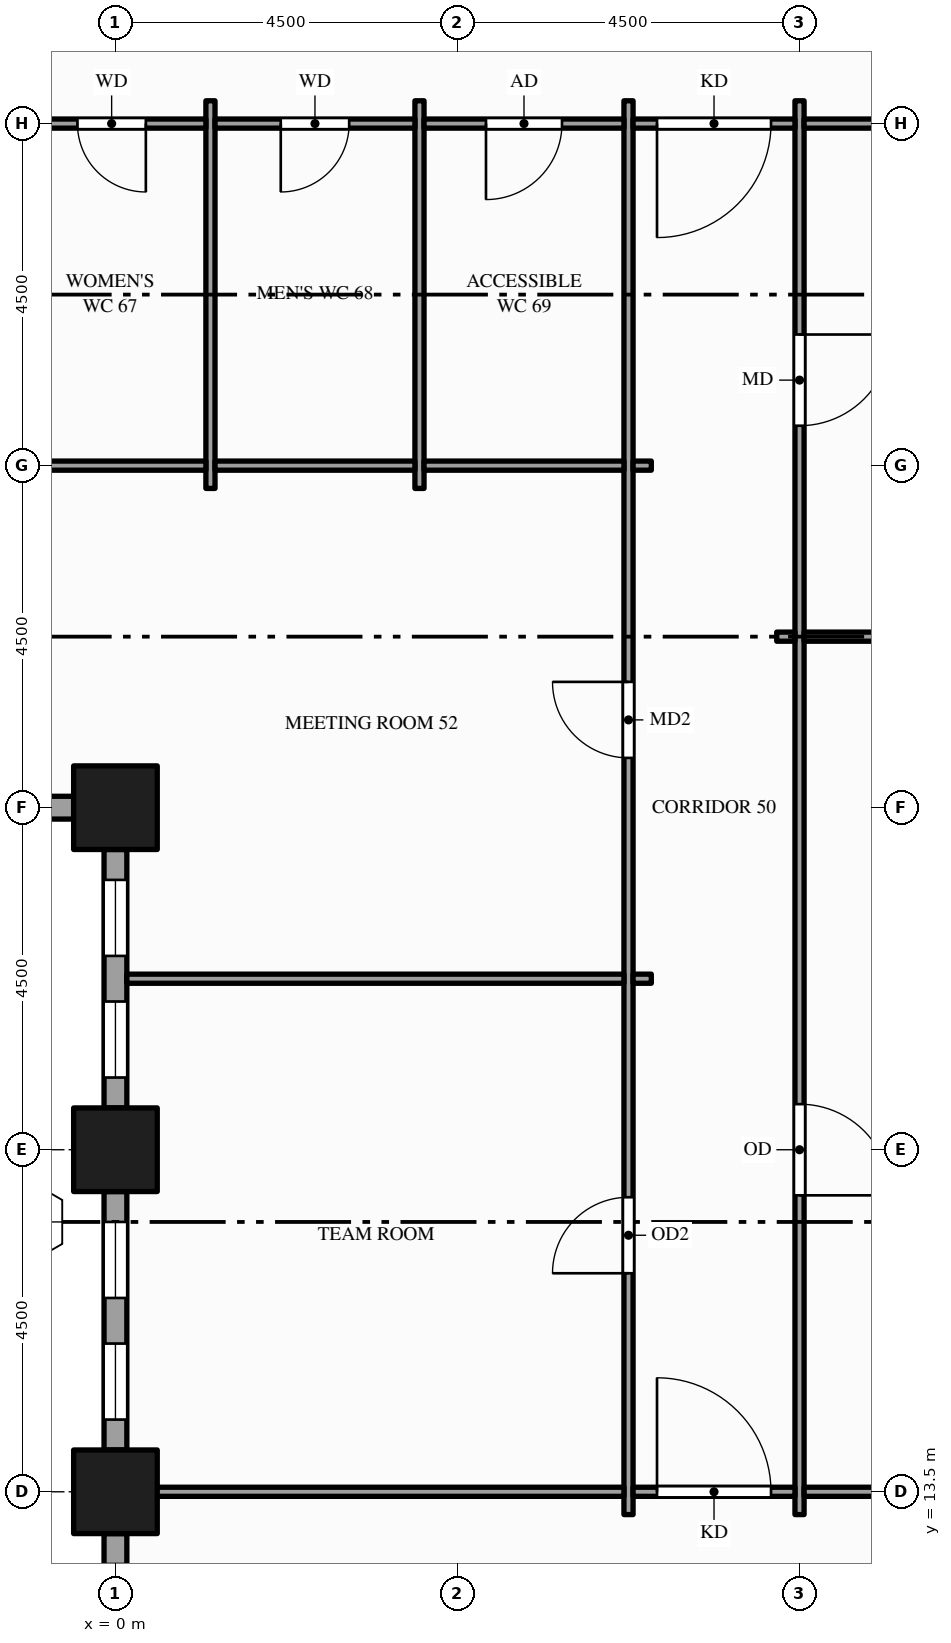
"""IFC4 building model, lengths in metres.
Left out: names, types, materials, properties, quantities, classifications, styles, units other than length and angle.
Written with IfcOpenShell. Run it as: python <this file> out.ifc"""

import sys

from ifc_helpers import new_model, si_unit, direction, frame, frame_2d, origin, origin_2d, place, context, subcontext, project, spatial, rectangle, hollow_rectangle, extrude, element, fill, save


model = new_model("IFC4")
c1 = context("Model", 3, precision=1e-05, world=origin(), true_north=direction((0.0, 1.0)))
c2 = subcontext(c1, "Body", "Model", "MODEL_VIEW")
j1 = project(units=[si_unit("LENGTHUNIT", "METRE"), si_unit("PLANEANGLEUNIT", "RADIAN")], contexts=[c1])
p1 = place(None, origin())
s1 = spatial("IfcSite", under=j1, at=p1, CompositionType="ELEMENT")
p2 = place(p1, origin())
s2 = spatial("IfcBuilding", under=s1, at=p2, CompositionType="ELEMENT")
p3 = place(p2, frame((0.0, 0.0, 45.0)))
s3 = spatial("IfcBuildingStorey", under=s2, at=p3, CompositionType="ELEMENT", Elevation=45.0)
for number, where, z_axis, x_axis in (
    (1, (0.0, 13.5, -0.15), (0.0, 0.0, 1.0), (1.0, 0.0, 0.0)),
    (2, (0.0, 18.0, -0.15), (0.0, 0.0, 1.0), (1.0, 0.0, 0.0)),
    (3, (0.0, 22.5, -0.15), (0.0, 0.0, 1.0), (1.0, 0.0, 0.0)),
):
    element("IfcColumn", number, at=place(p3, frame(where, z_axis=z_axis, x_axis=x_axis)), inside=s3, PredefinedType="COLUMN", context=c2, shape_type="SweptSolid", body=[
        extrude(hollow_rectangle(XDim=1.1, YDim=1.1, WallThickness=0.06, at=origin_2d()), origin(), (0.0, 0.0, 1.0), 4.0),
    ])
p4 = place(p3, frame((-0.95, 22.5, 0.0), z_axis=(0.0, 0.0, 1.0), x_axis=(1.0, 0.0, 0.0)))
e4 = element("IfcWall", 4, at=p4, inside=s3, PredefinedType="STANDARD", context=c2, shape_type="SweptSolid", body=[
    extrude(rectangle(XDim=0.4, YDim=0.3, at=frame_2d((0.2, 0.0))), origin(), (0.0, 0.0, 1.0), 3.144),
])
p5 = place(p3, frame((0.0, 21.95, 0.0), z_axis=(0.0, 0.0, 1.0), x_axis=(0.0, -1.0, 0.0)))
e5 = element("IfcWall", 5, at=p5, inside=s3, PredefinedType="STANDARD", context=c2, shape_type="SweptSolid", body=[
    extrude(rectangle(XDim=3.4, YDim=0.3, at=frame_2d((1.7, 0.0))), origin(), (0.0, 0.0, 1.0), 3.144),
])
p6 = place(p5, frame((0.4, 0.0, 0.9)))
e6 = element("IfcOpeningElement", 6, at=p6, cuts=e5, PredefinedType="OPENING", context=c2, shape_type="SweptSolid", body=[
    extrude(rectangle(XDim=1.0, YDim=2.0, at=frame_2d((0.5, 1.0))), frame((0.0, 0.16, 0.0), z_axis=(0.0, -1.0, 0.0), x_axis=(1.0, 0.0, 0.0)), (0.0, 0.0, 1.0), 0.32),
])
p7 = place(p5, frame((2.0, 0.0, 0.9)))
e7 = element("IfcOpeningElement", 7, at=p7, cuts=e5, PredefinedType="OPENING", context=c2, shape_type="SweptSolid", body=[
    extrude(rectangle(XDim=1.0, YDim=2.0, at=frame_2d((0.5, 1.0))), frame((0.0, 0.16, 0.0), z_axis=(0.0, -1.0, 0.0), x_axis=(1.0, 0.0, 0.0)), (0.0, 0.0, 1.0), 0.32),
])
p8 = place(p3, frame((0.0, 17.45, 0.0), z_axis=(0.0, 0.0, 1.0), x_axis=(0.0, -1.0, 0.0)))
e8 = element("IfcWall", 8, at=p8, inside=s3, PredefinedType="STANDARD", context=c2, shape_type="SweptSolid", body=[
    extrude(rectangle(XDim=3.4, YDim=0.3, at=frame_2d((1.7, 0.0))), origin(), (0.0, 0.0, 1.0), 3.144),
])
p9 = place(p8, frame((0.4, 0.0, 0.9)))
e9 = element("IfcOpeningElement", 9, at=p9, cuts=e8, PredefinedType="OPENING", context=c2, shape_type="SweptSolid", body=[
    extrude(rectangle(XDim=1.0, YDim=2.0, at=frame_2d((0.5, 1.0))), frame((0.0, 0.16, 0.0), z_axis=(0.0, -1.0, 0.0), x_axis=(1.0, 0.0, 0.0)), (0.0, 0.0, 1.0), 0.32),
])
p10 = place(p8, frame((2.0, 0.0, 0.9)))
e10 = element("IfcOpeningElement", 10, at=p10, cuts=e8, PredefinedType="OPENING", context=c2, shape_type="SweptSolid", body=[
    extrude(rectangle(XDim=1.0, YDim=2.0, at=frame_2d((0.5, 1.0))), frame((0.0, 0.16, 0.0), z_axis=(0.0, -1.0, 0.0), x_axis=(1.0, 0.0, 0.0)), (0.0, 0.0, 1.0), 0.32),
])
p11 = place(p3, frame((0.0, 12.95, 0.0), z_axis=(0.0, 0.0, 1.0), x_axis=(0.0, -1.0, 0.0)))
e11 = element("IfcWall", 11, at=p11, inside=s3, PredefinedType="STANDARD", context=c2, shape_type="SweptSolid", body=[
    extrude(rectangle(XDim=3.4, YDim=0.3, at=frame_2d((1.7, 0.0))), origin(), (0.0, 0.0, 1.0), 3.144),
])
p12 = place(p11, frame((0.4, 0.0, 0.9)))
e12 = element("IfcOpeningElement", 12, at=p12, cuts=e11, PredefinedType="OPENING", context=c2, shape_type="SweptSolid", body=[
    extrude(rectangle(XDim=1.0, YDim=2.0, at=frame_2d((0.5, 1.0))), frame((0.0, 0.16, 0.0), z_axis=(0.0, -1.0, 0.0), x_axis=(1.0, 0.0, 0.0)), (0.0, 0.0, 1.0), 0.32),
])
p13 = place(p11, frame((2.0, 0.0, 0.9)))
e13 = element("IfcOpeningElement", 13, at=p13, cuts=e11, PredefinedType="OPENING", context=c2, shape_type="SweptSolid", body=[
    extrude(rectangle(XDim=1.0, YDim=2.0, at=frame_2d((0.5, 1.0))), frame((0.0, 0.16, 0.0), z_axis=(0.0, -1.0, 0.0), x_axis=(1.0, 0.0, 0.0)), (0.0, 0.0, 1.0), 0.32),
])
for number, where, z_axis, x_axis in (
    (14, (1.25, 26.7, 0.0), (0.0, 0.0, 1.0), (0.0, 1.0, 0.0)),
    (15, (4.0, 26.7, 0.0), (0.0, 0.0, 1.0), (0.0, 1.0, 0.0)),
):
    element("IfcWall", number, at=place(p3, frame(where, z_axis=z_axis, x_axis=x_axis)), inside=s3, PredefinedType="PARTITIONING", context=c2, shape_type="SweptSolid", body=[
        extrude(rectangle(XDim=5.1, YDim=0.12, at=frame_2d((2.55, 0.0))), origin(), (0.0, 0.0, 1.0), 3.85),
    ])
p14 = place(p3, frame((6.75, 13.2, 0.0), z_axis=(0.0, 0.0, 1.0), x_axis=(0.0, 1.0, 0.0)))
e16 = element("IfcWall", 16, at=p14, inside=s3, PredefinedType="PARTITIONING", context=c2, shape_type="SweptSolid", body=[
    extrude(rectangle(XDim=18.6, YDim=0.12, at=frame_2d((9.3, 0.0))), origin(), (0.0, 0.0, 1.0), 2.6),
])
p15 = place(p14, frame((3.175, 0.0, 0.0)))
e17 = element("IfcOpeningElement", 17, at=p15, cuts=e16, PredefinedType="OPENING", context=c2, shape_type="SweptSolid", body=[
    extrude(rectangle(XDim=1.0, YDim=2.1, at=frame_2d((0.5, 1.05))), frame((0.0, 0.07, 0.0), z_axis=(0.0, -1.0, 0.0), x_axis=(1.0, 0.0, 0.0)), (0.0, 0.0, 1.0), 0.14),
])
p16 = place(p14, frame((9.955, 0.0, 0.0)))
e18 = element("IfcOpeningElement", 18, at=p16, cuts=e16, PredefinedType="OPENING", context=c2, shape_type="SweptSolid", body=[
    extrude(rectangle(XDim=1.0, YDim=2.1, at=frame_2d((0.5, 1.05))), frame((0.0, 0.07, 0.0), z_axis=(0.0, -1.0, 0.0), x_axis=(1.0, 0.0, 0.0)), (0.0, 0.0, 1.0), 0.14),
])
p17 = place(p3, frame((9.0, 13.2, 0.0), z_axis=(0.0, 0.0, 1.0), x_axis=(0.0, 1.0, 0.0)))
e19 = element("IfcWall", 19, at=p17, inside=s3, PredefinedType="PARTITIONING", context=c2, shape_type="SweptSolid", body=[
    extrude(rectangle(XDim=18.6, YDim=0.12, at=frame_2d((9.3, 0.0))), origin(), (0.0, 0.0, 1.0), 2.6),
])
p18 = place(p17, frame((14.325, 0.0, 0.0)))
e20 = element("IfcOpeningElement", 20, at=p18, cuts=e19, PredefinedType="OPENING", context=c2, shape_type="SweptSolid", body=[
    extrude(rectangle(XDim=1.2, YDim=2.1, at=frame_2d((0.6, 1.05))), frame((0.0, 0.07, 0.0), z_axis=(0.0, -1.0, 0.0), x_axis=(1.0, 0.0, 0.0)), (0.0, 0.0, 1.0), 0.14),
])
p19 = place(p17, frame((4.2, 0.0, 0.0)))
e21 = element("IfcOpeningElement", 21, at=p19, cuts=e19, PredefinedType="OPENING", context=c2, shape_type="SweptSolid", body=[
    extrude(rectangle(XDim=1.2, YDim=2.1, at=frame_2d((0.6, 1.05))), frame((0.0, 0.07, 0.0), z_axis=(0.0, -1.0, 0.0), x_axis=(1.0, 0.0, 0.0)), (0.0, 0.0, 1.0), 0.14),
])
p20 = place(p3, frame((0.15, 13.5, 0.0), z_axis=(0.0, 0.0, 1.0), x_axis=(1.0, 0.0, 0.0)))
e22 = element("IfcWall", 22, at=p20, inside=s3, PredefinedType="PARTITIONING", context=c2, shape_type="SweptSolid", body=[
    extrude(rectangle(XDim=6.54, YDim=0.12, at=frame_2d((3.27, 0.0))), origin(), (0.0, 0.0, 1.0), 2.938),
])
p21 = place(p3, frame((6.81, 13.5, 0.0), z_axis=(0.0, 0.0, 1.0), x_axis=(1.0, 0.0, 0.0)))
e23 = element("IfcWall", 23, at=p21, inside=s3, PredefinedType="PARTITIONING", context=c2, shape_type="SweptSolid", body=[
    extrude(rectangle(XDim=2.13, YDim=0.12, at=frame_2d((1.065, 0.0))), origin(), (0.0, 0.0, 1.0), 2.938),
])
p22 = place(p21, frame((0.315, 0.0, 0.0)))
e24 = element("IfcOpeningElement", 24, at=p22, cuts=e23, PredefinedType="OPENING", context=c2, shape_type="SweptSolid", body=[
    extrude(rectangle(XDim=1.5, YDim=2.1, at=frame_2d((0.75, 1.05))), frame((0.0, 0.07, 0.0), z_axis=(0.0, -1.0, 0.0), x_axis=(1.0, 0.0, 0.0)), (0.0, 0.0, 1.0), 0.14),
])
p23 = place(p3, frame((9.06, 13.5, 0.0), z_axis=(0.0, 0.0, 1.0), x_axis=(1.0, 0.0, 0.0)))
e25 = element("IfcWall", 25, at=p23, inside=s3, PredefinedType="PARTITIONING", context=c2, shape_type="SweptSolid", body=[
    extrude(rectangle(XDim=20.13, YDim=0.12, at=frame_2d((10.065, 0.0))), origin(), (0.0, 0.0, 1.0), 2.938),
])
p24 = place(p23, frame((3.54, 0.0, 0.0)))
e26 = element("IfcOpeningElement", 26, at=p24, cuts=e25, PredefinedType="OPENING", context=c2, shape_type="SweptSolid", body=[
    extrude(rectangle(XDim=1.8, YDim=2.1, at=frame_2d((0.9, 1.05))), frame((0.0, 0.07, 0.0), z_axis=(0.0, -1.0, 0.0), x_axis=(1.0, 0.0, 0.0)), (0.0, 0.0, 1.0), 0.14),
])
p25 = place(p3, frame((0.15, 20.25, 0.0), z_axis=(0.0, 0.0, 1.0), x_axis=(1.0, 0.0, 0.0)))
e27 = element("IfcWall", 27, at=p25, inside=s3, PredefinedType="PARTITIONING", context=c2, shape_type="SweptSolid", body=[
    extrude(rectangle(XDim=6.54, YDim=0.12, at=frame_2d((3.27, 0.0))), origin(), (0.0, 0.0, 1.0), 2.938),
])
for number, where, z_axis, x_axis in (
    (28, (6.81, 20.25, 0.0), (0.0, 0.0, 1.0), (1.0, 0.0, 0.0)),
    (29, (8.7, 24.75, 0.0), (0.0, 0.0, 1.0), (1.0, 0.0, 0.0)),
):
    element("IfcWall", number, at=place(p3, frame(where, z_axis=z_axis, x_axis=x_axis)), inside=s3, PredefinedType="PARTITIONING", context=c2, shape_type="SweptSolid", body=[
        extrude(rectangle(XDim=0.24, YDim=0.12, at=frame_2d((0.12, 0.0))), origin(), (0.0, 0.0, 1.0), 2.938),
    ])
p26 = place(p3, frame((9.06, 24.75, 0.0), z_axis=(0.0, 0.0, 1.0), x_axis=(1.0, 0.0, 0.0)))
e30 = element("IfcWall", 30, at=p26, inside=s3, PredefinedType="PARTITIONING", context=c2, shape_type="SweptSolid", body=[
    extrude(rectangle(XDim=13.69, YDim=0.12, at=frame_2d((6.845, 0.0))), origin(), (0.0, 0.0, 1.0), 2.938),
])
p27 = place(p3, frame((-1.35, 27.0, 0.0), z_axis=(0.0, 0.0, 1.0), x_axis=(1.0, 0.0, 0.0)))
e31 = element("IfcWall", 31, at=p27, inside=s3, PredefinedType="PARTITIONING", context=c2, shape_type="SweptSolid", body=[
    extrude(rectangle(XDim=2.54, YDim=0.12, at=frame_2d((1.27, 0.0))), origin(), (0.0, 0.0, 1.0), 2.938),
])
for number, where, z_axis, x_axis in (
    (32, (1.31, 27.0, 0.0), (0.0, 0.0, 1.0), (1.0, 0.0, 0.0)),
    (33, (4.06, 27.0, 0.0), (0.0, 0.0, 1.0), (1.0, 0.0, 0.0)),
):
    element("IfcWall", number, at=place(p3, frame(where, z_axis=z_axis, x_axis=x_axis)), inside=s3, PredefinedType="PARTITIONING", context=c2, shape_type="SweptSolid", body=[
        extrude(rectangle(XDim=2.63, YDim=0.12, at=frame_2d((1.315, 0.0))), origin(), (0.0, 0.0, 1.0), 2.938),
    ])
p28 = place(p3, frame((6.81, 27.0, 0.0), z_axis=(0.0, 0.0, 1.0), x_axis=(1.0, 0.0, 0.0)))
e34 = element("IfcWall", 34, at=p28, inside=s3, PredefinedType="PARTITIONING", context=c2, shape_type="SweptSolid", body=[
    extrude(rectangle(XDim=0.24, YDim=0.12, at=frame_2d((0.12, 0.0))), origin(), (0.0, 0.0, 1.0), 2.938),
])
p29 = place(p3, frame((-1.35, 31.5, 0.0), z_axis=(0.0, 0.0, 1.0), x_axis=(1.0, 0.0, 0.0)))
e35 = element("IfcWall", 35, at=p29, inside=s3, PredefinedType="PARTITIONING", context=c2, shape_type="SweptSolid", body=[
    extrude(rectangle(XDim=2.54, YDim=0.12, at=frame_2d((1.27, 0.0))), origin(), (0.0, 0.0, 1.0), 2.938),
])
p30 = place(p29, frame((0.85, 0.0, 0.0)))
e36 = element("IfcOpeningElement", 36, at=p30, cuts=e35, PredefinedType="OPENING", context=c2, shape_type="SweptSolid", body=[
    extrude(rectangle(XDim=0.9, YDim=2.1, at=frame_2d((0.45, 1.05))), frame((0.0, 0.07, 0.0), z_axis=(0.0, -1.0, 0.0), x_axis=(1.0, 0.0, 0.0)), (0.0, 0.0, 1.0), 0.14),
])
p31 = place(p3, frame((1.31, 31.5, 0.0), z_axis=(0.0, 0.0, 1.0), x_axis=(1.0, 0.0, 0.0)))
e37 = element("IfcWall", 37, at=p31, inside=s3, PredefinedType="PARTITIONING", context=c2, shape_type="SweptSolid", body=[
    extrude(rectangle(XDim=2.63, YDim=0.12, at=frame_2d((1.315, 0.0))), origin(), (0.0, 0.0, 1.0), 2.938),
])
p32 = place(p31, frame((0.865, 0.0, 0.0)))
e38 = element("IfcOpeningElement", 38, at=p32, cuts=e37, PredefinedType="OPENING", context=c2, shape_type="SweptSolid", body=[
    extrude(rectangle(XDim=0.9, YDim=2.1, at=frame_2d((0.45, 1.05))), frame((0.0, 0.07, 0.0), z_axis=(0.0, -1.0, 0.0), x_axis=(1.0, 0.0, 0.0)), (0.0, 0.0, 1.0), 0.14),
])
p33 = place(p3, frame((4.06, 31.5, 0.0), z_axis=(0.0, 0.0, 1.0), x_axis=(1.0, 0.0, 0.0)))
e39 = element("IfcWall", 39, at=p33, inside=s3, PredefinedType="PARTITIONING", context=c2, shape_type="SweptSolid", body=[
    extrude(rectangle(XDim=2.63, YDim=0.12, at=frame_2d((1.315, 0.0))), origin(), (0.0, 0.0, 1.0), 2.938),
])
p34 = place(p33, frame((0.815, 0.0, 0.0)))
e40 = element("IfcOpeningElement", 40, at=p34, cuts=e39, PredefinedType="OPENING", context=c2, shape_type="SweptSolid", body=[
    extrude(rectangle(XDim=1.0, YDim=2.1, at=frame_2d((0.5, 1.05))), frame((0.0, 0.07, 0.0), z_axis=(0.0, -1.0, 0.0), x_axis=(1.0, 0.0, 0.0)), (0.0, 0.0, 1.0), 0.14),
])
p35 = place(p3, frame((6.81, 31.5, 0.0), z_axis=(0.0, 0.0, 1.0), x_axis=(1.0, 0.0, 0.0)))
e41 = element("IfcWall", 41, at=p35, inside=s3, PredefinedType="PARTITIONING", context=c2, shape_type="SweptSolid", body=[
    extrude(rectangle(XDim=2.13, YDim=0.12, at=frame_2d((1.065, 0.0))), origin(), (0.0, 0.0, 1.0), 2.938),
])
p36 = place(p35, frame((0.315, 0.0, 0.0)))
e42 = element("IfcOpeningElement", 42, at=p36, cuts=e41, PredefinedType="OPENING", context=c2, shape_type="SweptSolid", body=[
    extrude(rectangle(XDim=1.5, YDim=2.1, at=frame_2d((0.75, 1.05))), frame((0.0, 0.07, 0.0), z_axis=(0.0, -1.0, 0.0), x_axis=(1.0, 0.0, 0.0)), (0.0, 0.0, 1.0), 0.14),
])
p37 = place(p3, frame((9.06, 31.5, 0.0), z_axis=(0.0, 0.0, 1.0), x_axis=(1.0, 0.0, 0.0)))
e43 = element("IfcWall", 43, at=p37, inside=s3, PredefinedType="PARTITIONING", context=c2, shape_type="SweptSolid", body=[
    extrude(rectangle(XDim=11.79, YDim=0.12, at=frame_2d((5.895, 0.0))), origin(), (0.0, 0.0, 1.0), 2.938),
])
p38 = place(p6, origin())
e44 = element("IfcWindow", 44, at=p38, inside=s3, PartitioningType="SINGLE_PANEL", PredefinedType="WINDOW", context=c2, shape_type="SweptSolid", body=[
    extrude(rectangle(XDim=1.0, YDim=2.0, at=frame_2d((0.5, 1.0))), frame((0.0, 0.03, 0.0), z_axis=(0.0, -1.0, 0.0), x_axis=(1.0, 0.0, 0.0)), (0.0, 0.0, 1.0), 0.06),
])
fill(e6, e44)
p39 = place(p7, origin())
e45 = element("IfcWindow", 45, at=p39, inside=s3, PartitioningType="SINGLE_PANEL", PredefinedType="WINDOW", context=c2, shape_type="SweptSolid", body=[
    extrude(rectangle(XDim=1.0, YDim=2.0, at=frame_2d((0.5, 1.0))), frame((0.0, 0.03, 0.0), z_axis=(0.0, -1.0, 0.0), x_axis=(1.0, 0.0, 0.0)), (0.0, 0.0, 1.0), 0.06),
])
fill(e7, e45)
p40 = place(p9, origin())
e46 = element("IfcWindow", 46, at=p40, inside=s3, PartitioningType="SINGLE_PANEL", PredefinedType="WINDOW", context=c2, shape_type="SweptSolid", body=[
    extrude(rectangle(XDim=1.0, YDim=2.0, at=frame_2d((0.5, 1.0))), frame((0.0, 0.03, 0.0), z_axis=(0.0, -1.0, 0.0), x_axis=(1.0, 0.0, 0.0)), (0.0, 0.0, 1.0), 0.06),
])
fill(e9, e46)
p41 = place(p10, origin())
e47 = element("IfcWindow", 47, at=p41, inside=s3, PartitioningType="SINGLE_PANEL", PredefinedType="WINDOW", context=c2, shape_type="SweptSolid", body=[
    extrude(rectangle(XDim=1.0, YDim=2.0, at=frame_2d((0.5, 1.0))), frame((0.0, 0.03, 0.0), z_axis=(0.0, -1.0, 0.0), x_axis=(1.0, 0.0, 0.0)), (0.0, 0.0, 1.0), 0.06),
])
fill(e10, e47)
p42 = place(p22, origin())
e48 = element("IfcDoor", 48, at=p42, inside=s3, OperationType="SINGLE_SWING_LEFT", PredefinedType="DOOR", context=c2, shape_type="SweptSolid", body=[
    extrude(rectangle(XDim=1.5, YDim=2.1, at=frame_2d((0.75, 1.05))), frame((0.0, 0.025, 0.0), z_axis=(0.0, -1.0, 0.0), x_axis=(1.0, 0.0, 0.0)), (0.0, 0.0, 1.0), 0.05),
])
fill(e24, e48)
p43 = place(p36, origin())
e49 = element("IfcDoor", 49, at=p43, inside=s3, OperationType="SINGLE_SWING_LEFT", PredefinedType="DOOR", context=c2, shape_type="SweptSolid", body=[
    extrude(rectangle(XDim=1.5, YDim=2.1, at=frame_2d((0.75, 1.05))), frame((0.0, 0.025, 0.0), z_axis=(0.0, -1.0, 0.0), x_axis=(1.0, 0.0, 0.0)), (0.0, 0.0, 1.0), 0.05),
])
fill(e42, e49)
p44 = place(p15, origin())
e50 = element("IfcDoor", 50, at=p44, inside=s3, OperationType="SINGLE_SWING_LEFT", PredefinedType="DOOR", context=c2, shape_type="SweptSolid", body=[
    extrude(rectangle(XDim=1.0, YDim=2.1, at=frame_2d((0.5, 1.05))), frame((0.0, 0.025, 0.0), z_axis=(0.0, -1.0, 0.0), x_axis=(1.0, 0.0, 0.0)), (0.0, 0.0, 1.0), 0.05),
])
fill(e17, e50)
p45 = place(p16, origin())
e51 = element("IfcDoor", 51, at=p45, inside=s3, OperationType="SINGLE_SWING_RIGHT", PredefinedType="DOOR", context=c2, shape_type="SweptSolid", body=[
    extrude(rectangle(XDim=1.0, YDim=2.1, at=frame_2d((0.5, 1.05))), frame((0.0, 0.025, 0.0), z_axis=(0.0, -1.0, 0.0), x_axis=(1.0, 0.0, 0.0)), (0.0, 0.0, 1.0), 0.05),
])
fill(e18, e51)
p46 = place(p30, origin())
e52 = element("IfcDoor", 52, at=p46, inside=s3, OperationType="SINGLE_SWING_RIGHT", PredefinedType="DOOR", context=c2, shape_type="SweptSolid", body=[
    extrude(rectangle(XDim=0.9, YDim=2.1, at=frame_2d((0.45, 1.05))), frame((0.0, 0.025, 0.0), z_axis=(0.0, -1.0, 0.0), x_axis=(1.0, 0.0, 0.0)), (0.0, 0.0, 1.0), 0.05),
])
fill(e36, e52)
p47 = place(p32, origin())
e53 = element("IfcDoor", 53, at=p47, inside=s3, OperationType="SINGLE_SWING_LEFT", PredefinedType="DOOR", context=c2, shape_type="SweptSolid", body=[
    extrude(rectangle(XDim=0.9, YDim=2.1, at=frame_2d((0.45, 1.05))), frame((0.0, 0.025, 0.0), z_axis=(0.0, -1.0, 0.0), x_axis=(1.0, 0.0, 0.0)), (0.0, 0.0, 1.0), 0.05),
])
fill(e38, e53)
p48 = place(p34, origin())
e54 = element("IfcDoor", 54, at=p48, inside=s3, OperationType="SINGLE_SWING_LEFT", PredefinedType="DOOR", context=c2, shape_type="SweptSolid", body=[
    extrude(rectangle(XDim=1.0, YDim=2.1, at=frame_2d((0.5, 1.05))), frame((0.0, 0.025, 0.0), z_axis=(0.0, -1.0, 0.0), x_axis=(1.0, 0.0, 0.0)), (0.0, 0.0, 1.0), 0.05),
])
fill(e40, e54)
p49 = place(p18, origin())
e55 = element("IfcDoor", 55, at=p49, inside=s3, OperationType="SINGLE_SWING_RIGHT", PredefinedType="DOOR", context=c2, shape_type="SweptSolid", body=[
    extrude(rectangle(XDim=1.2, YDim=2.1, at=frame_2d((0.6, 1.05))), frame((0.0, 0.025, 0.0), z_axis=(0.0, -1.0, 0.0), x_axis=(1.0, 0.0, 0.0)), (0.0, 0.0, 1.0), 0.05),
])
fill(e20, e55)
p50 = place(p19, origin())
e56 = element("IfcDoor", 56, at=p50, inside=s3, OperationType="SINGLE_SWING_LEFT", PredefinedType="DOOR", context=c2, shape_type="SweptSolid", body=[
    extrude(rectangle(XDim=1.2, YDim=2.1, at=frame_2d((0.6, 1.05))), frame((0.0, 0.025, 0.0), z_axis=(0.0, -1.0, 0.0), x_axis=(1.0, 0.0, 0.0)), (0.0, 0.0, 1.0), 0.05),
])
fill(e21, e56)
save(model, sys.argv[1])
